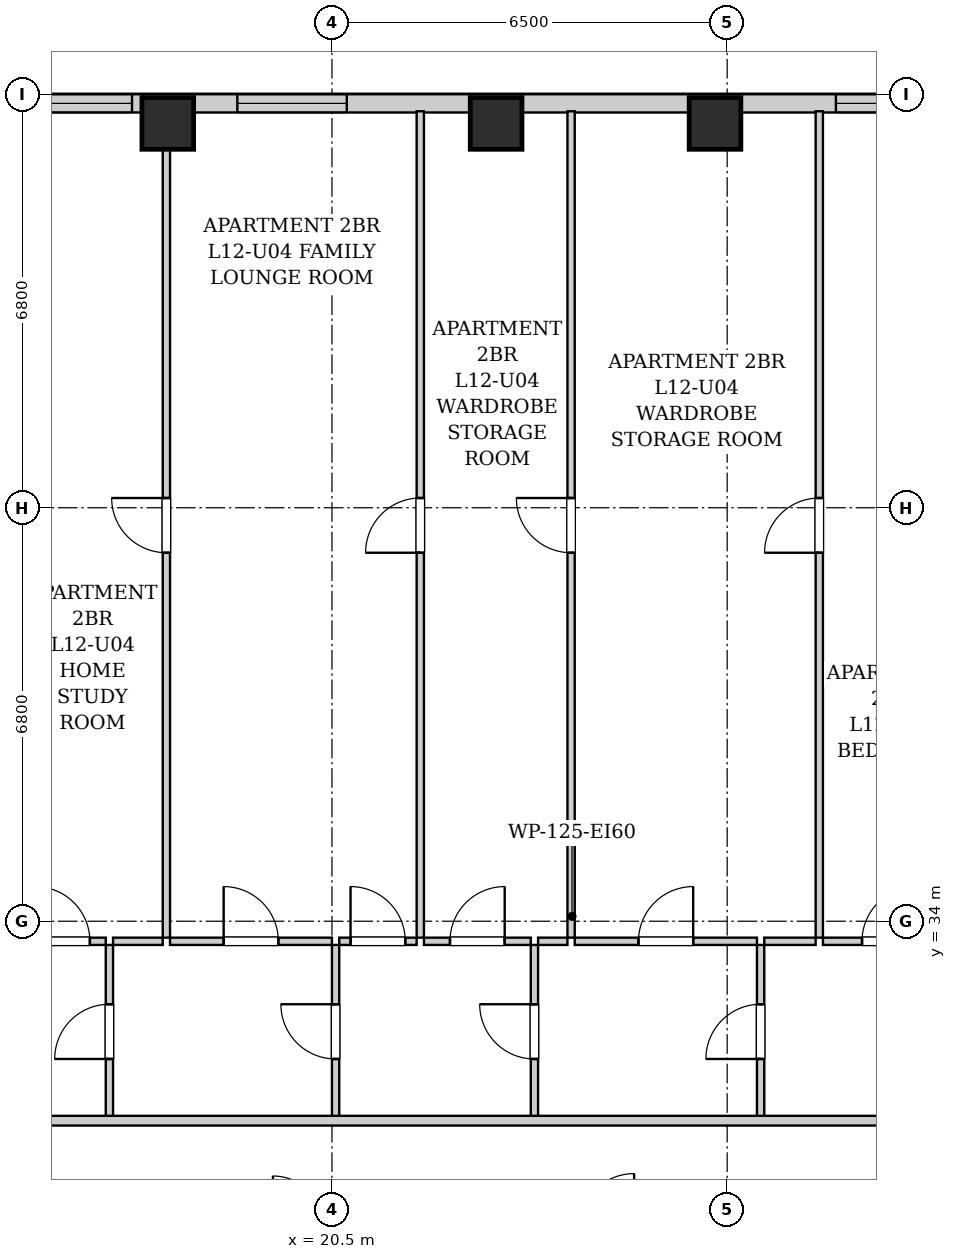
"""IFC4 building model, lengths in metres.
Left out: names, types, materials, properties, quantities, classifications, styles, units other than length and angle.
Written with IfcOpenShell. Run it as: python <this file> out.ifc"""

import sys

from ifc_helpers import new_model, si_unit, direction, frame, frame_2d, origin, origin_2d, place, context, subcontext, project, spatial, rectangle, extrude, element, fill, save


model = new_model("IFC4")
c1 = context("Model", 3, precision=1e-05, world=origin(), true_north=direction((0.0, 1.0)))
c2 = subcontext(c1, "Body", "Model", "MODEL_VIEW")
j1 = project(units=[si_unit("LENGTHUNIT", "METRE"), si_unit("PLANEANGLEUNIT", "RADIAN")], contexts=[c1])
p1 = place(None, origin())
s1 = spatial("IfcSite", under=j1, at=p1, CompositionType="ELEMENT")
p2 = place(p1, origin())
s2 = spatial("IfcBuilding", under=s1, at=p2, CompositionType="ELEMENT")
p3 = place(p2, frame((0.0, 0.0, 48.2)))
s3 = spatial("IfcBuildingStorey", under=s2, at=p3, CompositionType="ELEMENT", Elevation=48.2)
for number, where, z_axis, x_axis in (
    (1, (17.8, 47.12, 0.0), (0.0, 0.0, 1.0), (1.0, 0.0, 0.0)),
    (2, (23.2, 47.12, 0.0), (0.0, 0.0, 1.0), (1.0, 0.0, 0.0)),
    (3, (26.8, 47.12, 0.0), (0.0, 0.0, 1.0), (1.0, 0.0, 0.0)),
):
    element("IfcColumn", number, at=place(p3, frame(where, z_axis=z_axis, x_axis=x_axis)), inside=s3, PredefinedType="COLUMN", context=c2, shape_type="SweptSolid", body=[
        extrude(rectangle(XDim=0.85, YDim=0.85, at=origin_2d()), origin(), (0.0, 0.0, 1.0), 3.2),
    ])
p4 = place(p3, frame((10.0, 47.45, 0.0), z_axis=(0.0, 0.0, 1.0), x_axis=(1.0, 0.0, 0.0)))
e4 = element("IfcWall", 4, at=p4, inside=s3, PredefinedType="SOLIDWALL", context=c2, shape_type="SweptSolid", body=[
    extrude(rectangle(XDim=26.15, YDim=0.3, at=frame_2d((13.075, 0.0))), origin(), (0.0, 0.0, 1.0), 1.975),
])
p5 = place(p4, frame((5.862, 0.0, 0.55)))
e5 = element("IfcOpeningElement", 5, at=p5, cuts=e4, PredefinedType="OPENING", context=c2, shape_type="SweptSolid", body=[
    extrude(rectangle(XDim=1.35, YDim=1.2, at=frame_2d((0.675, 0.6))), frame((0.0, 0.16, 0.0), z_axis=(0.0, -1.0, 0.0), x_axis=(1.0, 0.0, 0.0)), (0.0, 0.0, 1.0), 0.32),
])
p6 = place(p4, frame((8.944, 0.0, 0.55)))
e6 = element("IfcOpeningElement", 6, at=p6, cuts=e4, PredefinedType="OPENING", context=c2, shape_type="SweptSolid", body=[
    extrude(rectangle(XDim=1.8, YDim=1.2, at=frame_2d((0.9, 0.6))), frame((0.0, 0.16, 0.0), z_axis=(0.0, -1.0, 0.0), x_axis=(1.0, 0.0, 0.0)), (0.0, 0.0, 1.0), 0.32),
])
p7 = place(p4, frame((18.788, 0.0, 0.55)))
e7 = element("IfcOpeningElement", 7, at=p7, cuts=e4, PredefinedType="OPENING", context=c2, shape_type="SweptSolid", body=[
    extrude(rectangle(XDim=1.8, YDim=1.2, at=frame_2d((0.9, 0.6))), frame((0.0, 0.16, 0.0), z_axis=(0.0, -1.0, 0.0), x_axis=(1.0, 0.0, 0.0)), (0.0, 0.0, 1.0), 0.32),
])
p8 = place(p4, frame((21.265, 0.0, 0.55)))
e8 = element("IfcOpeningElement", 8, at=p8, cuts=e4, PredefinedType="OPENING", context=c2, shape_type="SweptSolid", body=[
    extrude(rectangle(XDim=1.35, YDim=1.2, at=frame_2d((0.675, 0.6))), frame((0.0, 0.16, 0.0), z_axis=(0.0, -1.0, 0.0), x_axis=(1.0, 0.0, 0.0)), (0.0, 0.0, 1.0), 0.32),
])
p9 = place(p4, frame((23.785, 0.0, 0.55)))
e9 = element("IfcOpeningElement", 9, at=p9, cuts=e4, PredefinedType="OPENING", context=c2, shape_type="SweptSolid", body=[
    extrude(rectangle(XDim=1.8, YDim=1.2, at=frame_2d((0.9, 0.6))), frame((0.0, 0.16, 0.0), z_axis=(0.0, -1.0, 0.0), x_axis=(1.0, 0.0, 0.0)), (0.0, 0.0, 1.0), 0.32),
])
p10 = place(p3, frame((16.84, 30.76, 0.0), z_axis=(0.0, 0.0, 1.0), x_axis=(0.0, 1.0, 0.0)))
e10 = element("IfcWall", 10, at=p10, inside=s3, PredefinedType="PARTITIONING", context=c2, shape_type="SweptSolid", body=[
    extrude(rectangle(XDim=2.85, YDim=0.12, at=frame_2d((1.425, 0.0))), origin(), (0.0, 0.0, 1.0), 2.94),
])
p11 = place(p10, frame((0.975, 0.0, 0.0)))
e11 = element("IfcOpeningElement", 11, at=p11, cuts=e10, PredefinedType="OPENING", context=c2, shape_type="SweptSolid", body=[
    extrude(rectangle(XDim=0.9, YDim=2.05, at=frame_2d((0.45, 1.025))), frame((0.0, 0.07, 0.0), z_axis=(0.0, -1.0, 0.0), x_axis=(1.0, 0.0, 0.0)), (0.0, 0.0, 1.0), 0.14),
])
p12 = place(p3, frame((15.357, 33.67, 0.0), z_axis=(0.0, 0.0, 1.0), x_axis=(1.0, 0.0, 0.0)))
e12 = element("IfcWall", 12, at=p12, inside=s3, PredefinedType="PARTITIONING", context=c2, shape_type="SweptSolid", body=[
    extrude(rectangle(XDim=1.423, YDim=0.12, at=frame_2d((0.711, 0.0))), origin(), (0.0, 0.0, 1.0), 2.94),
])
p13 = place(p12, frame((0.262, 0.0, 0.0)))
e13 = element("IfcOpeningElement", 13, at=p13, cuts=e12, PredefinedType="OPENING", context=c2, shape_type="SweptSolid", body=[
    extrude(rectangle(XDim=0.9, YDim=2.05, at=frame_2d((0.45, 1.025))), frame((0.0, 0.07, 0.0), z_axis=(0.0, -1.0, 0.0), x_axis=(1.0, 0.0, 0.0)), (0.0, 0.0, 1.0), 0.14),
])
p14 = place(p3, frame((20.56, 30.76, 0.0), z_axis=(0.0, 0.0, 1.0), x_axis=(0.0, 1.0, 0.0)))
e14 = element("IfcWall", 14, at=p14, inside=s3, PredefinedType="PARTITIONING", context=c2, shape_type="SweptSolid", body=[
    extrude(rectangle(XDim=2.85, YDim=0.12, at=frame_2d((1.425, 0.0))), origin(), (0.0, 0.0, 1.0), 2.94),
])
p15 = place(p14, frame((0.975, 0.0, 0.0)))
e15 = element("IfcOpeningElement", 15, at=p15, cuts=e14, PredefinedType="OPENING", context=c2, shape_type="SweptSolid", body=[
    extrude(rectangle(XDim=0.9, YDim=2.05, at=frame_2d((0.45, 1.025))), frame((0.0, 0.07, 0.0), z_axis=(0.0, -1.0, 0.0), x_axis=(1.0, 0.0, 0.0)), (0.0, 0.0, 1.0), 0.14),
])
p16 = place(p3, frame((16.9, 33.67, 0.0), z_axis=(0.0, 0.0, 1.0), x_axis=(1.0, 0.0, 0.0)))
e16 = element("IfcWall", 16, at=p16, inside=s3, PredefinedType="PARTITIONING", context=c2, shape_type="SweptSolid", body=[
    extrude(rectangle(XDim=0.817, YDim=0.12, at=frame_2d((0.409, 0.0))), origin(), (0.0, 0.0, 1.0), 2.94),
])
p17 = place(p3, frame((17.837, 33.67, 0.0), z_axis=(0.0, 0.0, 1.0), x_axis=(1.0, 0.0, 0.0)))
e17 = element("IfcWall", 17, at=p17, inside=s3, PredefinedType="PARTITIONING", context=c2, shape_type="SweptSolid", body=[
    extrude(rectangle(XDim=2.663, YDim=0.12, at=frame_2d((1.332, 0.0))), origin(), (0.0, 0.0, 1.0), 2.94),
])
p18 = place(p17, frame((0.882, 0.0, 0.0)))
e18 = element("IfcOpeningElement", 18, at=p18, cuts=e17, PredefinedType="OPENING", context=c2, shape_type="SweptSolid", body=[
    extrude(rectangle(XDim=0.9, YDim=2.05, at=frame_2d((0.45, 1.025))), frame((0.0, 0.07, 0.0), z_axis=(0.0, -1.0, 0.0), x_axis=(1.0, 0.0, 0.0)), (0.0, 0.0, 1.0), 0.14),
])
p19 = place(p3, frame((23.83, 30.76, 0.0), z_axis=(0.0, 0.0, 1.0), x_axis=(0.0, 1.0, 0.0)))
e19 = element("IfcWall", 19, at=p19, inside=s3, PredefinedType="PARTITIONING", context=c2, shape_type="SweptSolid", body=[
    extrude(rectangle(XDim=2.85, YDim=0.12, at=frame_2d((1.425, 0.0))), origin(), (0.0, 0.0, 1.0), 2.94),
])
p20 = place(p19, frame((0.975, 0.0, 0.0)))
e20 = element("IfcOpeningElement", 20, at=p20, cuts=e19, PredefinedType="OPENING", context=c2, shape_type="SweptSolid", body=[
    extrude(rectangle(XDim=0.9, YDim=2.05, at=frame_2d((0.45, 1.025))), frame((0.0, 0.07, 0.0), z_axis=(0.0, -1.0, 0.0), x_axis=(1.0, 0.0, 0.0)), (0.0, 0.0, 1.0), 0.14),
])
p21 = place(p3, frame((20.62, 33.67, 0.0), z_axis=(0.0, 0.0, 1.0), x_axis=(1.0, 0.0, 0.0)))
e21 = element("IfcWall", 21, at=p21, inside=s3, PredefinedType="PARTITIONING", context=c2, shape_type="SweptSolid", body=[
    extrude(rectangle(XDim=1.273, YDim=0.12, at=frame_2d((0.636, 0.0))), origin(), (0.0, 0.0, 1.0), 2.94),
])
p22 = place(p21, frame((0.186, 0.0, 0.0)))
e22 = element("IfcOpeningElement", 22, at=p22, cuts=e21, PredefinedType="OPENING", context=c2, shape_type="SweptSolid", body=[
    extrude(rectangle(XDim=0.9, YDim=2.05, at=frame_2d((0.45, 1.025))), frame((0.0, 0.07, 0.0), z_axis=(0.0, -1.0, 0.0), x_axis=(1.0, 0.0, 0.0)), (0.0, 0.0, 1.0), 0.14),
])
p23 = place(p3, frame((22.013, 33.67, 0.0), z_axis=(0.0, 0.0, 1.0), x_axis=(1.0, 0.0, 0.0)))
e23 = element("IfcWall", 23, at=p23, inside=s3, PredefinedType="PARTITIONING", context=c2, shape_type="SweptSolid", body=[
    extrude(rectangle(XDim=1.757, YDim=0.12, at=frame_2d((0.878, 0.0))), origin(), (0.0, 0.0, 1.0), 2.94),
])
p24 = place(p23, frame((0.428, 0.0, 0.0)))
e24 = element("IfcOpeningElement", 24, at=p24, cuts=e23, PredefinedType="OPENING", context=c2, shape_type="SweptSolid", body=[
    extrude(rectangle(XDim=0.9, YDim=2.05, at=frame_2d((0.45, 1.025))), frame((0.0, 0.07, 0.0), z_axis=(0.0, -1.0, 0.0), x_axis=(1.0, 0.0, 0.0)), (0.0, 0.0, 1.0), 0.14),
])
p25 = place(p3, frame((27.55, 30.76, 0.0), z_axis=(0.0, 0.0, 1.0), x_axis=(0.0, 1.0, 0.0)))
e25 = element("IfcWall", 25, at=p25, inside=s3, PredefinedType="PARTITIONING", context=c2, shape_type="SweptSolid", body=[
    extrude(rectangle(XDim=2.85, YDim=0.12, at=frame_2d((1.425, 0.0))), origin(), (0.0, 0.0, 1.0), 2.94),
])
p26 = place(p25, frame((0.975, 0.0, 0.0)))
e26 = element("IfcOpeningElement", 26, at=p26, cuts=e25, PredefinedType="OPENING", context=c2, shape_type="SweptSolid", body=[
    extrude(rectangle(XDim=0.9, YDim=2.05, at=frame_2d((0.45, 1.025))), frame((0.0, 0.07, 0.0), z_axis=(0.0, -1.0, 0.0), x_axis=(1.0, 0.0, 0.0)), (0.0, 0.0, 1.0), 0.14),
])
p27 = place(p3, frame((23.89, 33.67, 0.0), z_axis=(0.0, 0.0, 1.0), x_axis=(1.0, 0.0, 0.0)))
e27 = element("IfcWall", 27, at=p27, inside=s3, PredefinedType="PARTITIONING", context=c2, shape_type="SweptSolid", body=[
    extrude(rectangle(XDim=0.483, YDim=0.12, at=frame_2d((0.242, 0.0))), origin(), (0.0, 0.0, 1.0), 2.94),
])
p28 = place(p3, frame((24.493, 33.67, 0.0), z_axis=(0.0, 0.0, 1.0), x_axis=(1.0, 0.0, 0.0)))
e28 = element("IfcWall", 28, at=p28, inside=s3, PredefinedType="PARTITIONING", context=c2, shape_type="SweptSolid", body=[
    extrude(rectangle(XDim=2.997, YDim=0.12, at=frame_2d((1.499, 0.0))), origin(), (0.0, 0.0, 1.0), 2.94),
])
p29 = place(p28, frame((1.048, 0.0, 0.0)))
e29 = element("IfcOpeningElement", 29, at=p29, cuts=e28, PredefinedType="OPENING", context=c2, shape_type="SweptSolid", body=[
    extrude(rectangle(XDim=0.9, YDim=2.05, at=frame_2d((0.45, 1.025))), frame((0.0, 0.07, 0.0), z_axis=(0.0, -1.0, 0.0), x_axis=(1.0, 0.0, 0.0)), (0.0, 0.0, 1.0), 0.14),
])
p30 = place(p3, frame((27.61, 33.67, 0.0), z_axis=(0.0, 0.0, 1.0), x_axis=(1.0, 0.0, 0.0)))
e30 = element("IfcWall", 30, at=p30, inside=s3, PredefinedType="PARTITIONING", context=c2, shape_type="SweptSolid", body=[
    extrude(rectangle(XDim=0.845, YDim=0.12, at=frame_2d((0.422, 0.0))), origin(), (0.0, 0.0, 1.0), 2.94),
])
p31 = place(p3, frame((28.575, 33.67, 0.0), z_axis=(0.0, 0.0, 1.0), x_axis=(1.0, 0.0, 0.0)))
e31 = element("IfcWall", 31, at=p31, inside=s3, PredefinedType="PARTITIONING", context=c2, shape_type="SweptSolid", body=[
    extrude(rectangle(XDim=2.185, YDim=0.12, at=frame_2d((1.093, 0.0))), origin(), (0.0, 0.0, 1.0), 2.94),
])
p32 = place(p31, frame((0.643, 0.0, 0.0)))
e32 = element("IfcOpeningElement", 32, at=p32, cuts=e31, PredefinedType="OPENING", context=c2, shape_type="SweptSolid", body=[
    extrude(rectangle(XDim=0.9, YDim=2.05, at=frame_2d((0.45, 1.025))), frame((0.0, 0.07, 0.0), z_axis=(0.0, -1.0, 0.0), x_axis=(1.0, 0.0, 0.0)), (0.0, 0.0, 1.0), 0.14),
])
p33 = place(p3, frame((17.777, 33.73, 0.0), z_axis=(0.0, 0.0, 1.0), x_axis=(0.0, 1.0, 0.0)))
e33 = element("IfcWall", 33, at=p33, inside=s3, PredefinedType="PARTITIONING", context=c2, shape_type="SweptSolid", body=[
    extrude(rectangle(XDim=13.59, YDim=0.12, at=frame_2d((6.795, 0.0))), origin(), (0.0, 0.0, 1.0), 2.232),
])
p34 = place(p33, frame((6.33, 0.0, 0.0)))
e34 = element("IfcOpeningElement", 34, at=p34, cuts=e33, PredefinedType="OPENING", context=c2, shape_type="SweptSolid", body=[
    extrude(rectangle(XDim=0.9, YDim=2.05, at=frame_2d((0.45, 1.025))), frame((0.0, 0.07, 0.0), z_axis=(0.0, -1.0, 0.0), x_axis=(1.0, 0.0, 0.0)), (0.0, 0.0, 1.0), 0.14),
])
p35 = place(p3, frame((21.953, 33.73, 0.0), z_axis=(0.0, 0.0, 1.0), x_axis=(0.0, 1.0, 0.0)))
e35 = element("IfcWall", 35, at=p35, inside=s3, PredefinedType="PARTITIONING", context=c2, shape_type="SweptSolid", body=[
    extrude(rectangle(XDim=13.59, YDim=0.12, at=frame_2d((6.795, 0.0))), origin(), (0.0, 0.0, 1.0), 2.94),
])
p36 = place(p35, frame((6.33, 0.0, 0.0)))
e36 = element("IfcOpeningElement", 36, at=p36, cuts=e35, PredefinedType="OPENING", context=c2, shape_type="SweptSolid", body=[
    extrude(rectangle(XDim=0.9, YDim=2.05, at=frame_2d((0.45, 1.025))), frame((0.0, 0.07, 0.0), z_axis=(0.0, -1.0, 0.0), x_axis=(1.0, 0.0, 0.0)), (0.0, 0.0, 1.0), 0.14),
])
p37 = place(p3, frame((24.433, 33.73, 0.0), z_axis=(0.0, 0.0, 1.0), x_axis=(0.0, 1.0, 0.0)))
e37 = element("IfcWall", 37, at=p37, inside=s3, PredefinedType="PARTITIONING", context=c2, shape_type="SweptSolid", body=[
    extrude(rectangle(XDim=13.59, YDim=0.12, at=frame_2d((6.795, 0.0))), origin(), (0.0, 0.0, 1.0), 2.94),
])
p38 = place(p37, frame((6.33, 0.0, 0.0)))
e38 = element("IfcOpeningElement", 38, at=p38, cuts=e37, PredefinedType="OPENING", context=c2, shape_type="SweptSolid", body=[
    extrude(rectangle(XDim=0.9, YDim=2.05, at=frame_2d((0.45, 1.025))), frame((0.0, 0.07, 0.0), z_axis=(0.0, -1.0, 0.0), x_axis=(1.0, 0.0, 0.0)), (0.0, 0.0, 1.0), 0.14),
])
p39 = place(p3, frame((28.515, 33.73, 0.0), z_axis=(0.0, 0.0, 1.0), x_axis=(0.0, 1.0, 0.0)))
e39 = element("IfcWall", 39, at=p39, inside=s3, PredefinedType="PARTITIONING", context=c2, shape_type="SweptSolid", body=[
    extrude(rectangle(XDim=13.59, YDim=0.12, at=frame_2d((6.795, 0.0))), origin(), (0.0, 0.0, 1.0), 2.94),
])
p40 = place(p39, frame((6.33, 0.0, 0.0)))
e40 = element("IfcOpeningElement", 40, at=p40, cuts=e39, PredefinedType="OPENING", context=c2, shape_type="SweptSolid", body=[
    extrude(rectangle(XDim=0.9, YDim=2.05, at=frame_2d((0.45, 1.025))), frame((0.0, 0.07, 0.0), z_axis=(0.0, -1.0, 0.0), x_axis=(1.0, 0.0, 0.0)), (0.0, 0.0, 1.0), 0.14),
])
p41 = place(p3, frame((10.05, 30.72, 0.0), z_axis=(0.0, 0.0, 1.0), x_axis=(1.0, 0.0, 0.0)))
e41 = element("IfcWall", 41, at=p41, inside=s3, PredefinedType="PARTITIONING", context=c2, shape_type="SweptSolid", body=[
    extrude(rectangle(XDim=33.9, YDim=0.16, at=frame_2d((16.95, 0.0))), origin(), (0.0, 0.0, 1.0), 2.94),
])
p42 = place(p41, frame((4.165, 0.0, 0.0)))
e42 = element("IfcOpeningElement", 42, at=p42, cuts=e41, PredefinedType="OPENING", context=c2, shape_type="SweptSolid", body=[
    extrude(rectangle(XDim=0.95, YDim=2.1, at=frame_2d((0.475, 1.05))), frame((0.0, 0.09, 0.0), z_axis=(0.0, -1.0, 0.0), x_axis=(1.0, 0.0, 0.0)), (0.0, 0.0, 1.0), 0.18),
])
p43 = place(p41, frame((27.495, 0.0, 0.0)))
e43 = element("IfcOpeningElement", 43, at=p43, cuts=e41, PredefinedType="OPENING", context=c2, shape_type="SweptSolid", body=[
    extrude(rectangle(XDim=0.95, YDim=2.1, at=frame_2d((0.475, 1.05))), frame((0.0, 0.09, 0.0), z_axis=(0.0, -1.0, 0.0), x_axis=(1.0, 0.0, 0.0)), (0.0, 0.0, 1.0), 0.18),
])
p44 = place(p11, origin())
e44 = element("IfcDoor", 44, at=p44, inside=s3, OperationType="SINGLE_SWING_LEFT", PredefinedType="DOOR", context=c2, shape_type="SweptSolid", body=[
    extrude(rectangle(XDim=0.9, YDim=2.05, at=frame_2d((0.45, 1.025))), frame((0.0, 0.025, 0.0), z_axis=(0.0, -1.0, 0.0), x_axis=(1.0, 0.0, 0.0)), (0.0, 0.0, 1.0), 0.05),
])
fill(e11, e44)
p45 = place(p13, origin())
e45 = element("IfcDoor", 45, at=p45, inside=s3, OperationType="SINGLE_SWING_LEFT", PredefinedType="DOOR", context=c2, shape_type="SweptSolid", body=[
    extrude(rectangle(XDim=0.9, YDim=2.05, at=frame_2d((0.45, 1.025))), frame((0.0, 0.025, 0.0), z_axis=(0.0, -1.0, 0.0), x_axis=(1.0, 0.0, 0.0)), (0.0, 0.0, 1.0), 0.05),
])
fill(e13, e45)
p46 = place(p15, origin())
e46 = element("IfcDoor", 46, at=p46, inside=s3, OperationType="SINGLE_SWING_RIGHT", PredefinedType="DOOR", context=c2, shape_type="SweptSolid", body=[
    extrude(rectangle(XDim=0.9, YDim=2.05, at=frame_2d((0.45, 1.025))), frame((0.0, 0.025, 0.0), z_axis=(0.0, -1.0, 0.0), x_axis=(1.0, 0.0, 0.0)), (0.0, 0.0, 1.0), 0.05),
])
fill(e15, e46)
p47 = place(p18, origin())
e47 = element("IfcDoor", 47, at=p47, inside=s3, OperationType="SINGLE_SWING_LEFT", PredefinedType="DOOR", context=c2, shape_type="SweptSolid", body=[
    extrude(rectangle(XDim=0.9, YDim=2.05, at=frame_2d((0.45, 1.025))), frame((0.0, 0.025, 0.0), z_axis=(0.0, -1.0, 0.0), x_axis=(1.0, 0.0, 0.0)), (0.0, 0.0, 1.0), 0.05),
])
fill(e18, e47)
p48 = place(p20, origin())
e48 = element("IfcDoor", 48, at=p48, inside=s3, OperationType="SINGLE_SWING_RIGHT", PredefinedType="DOOR", context=c2, shape_type="SweptSolid", body=[
    extrude(rectangle(XDim=0.9, YDim=2.05, at=frame_2d((0.45, 1.025))), frame((0.0, 0.025, 0.0), z_axis=(0.0, -1.0, 0.0), x_axis=(1.0, 0.0, 0.0)), (0.0, 0.0, 1.0), 0.05),
])
fill(e20, e48)
p49 = place(p22, origin())
e49 = element("IfcDoor", 49, at=p49, inside=s3, OperationType="SINGLE_SWING_LEFT", PredefinedType="DOOR", context=c2, shape_type="SweptSolid", body=[
    extrude(rectangle(XDim=0.9, YDim=2.05, at=frame_2d((0.45, 1.025))), frame((0.0, 0.025, 0.0), z_axis=(0.0, -1.0, 0.0), x_axis=(1.0, 0.0, 0.0)), (0.0, 0.0, 1.0), 0.05),
])
fill(e22, e49)
p50 = place(p24, origin())
e50 = element("IfcDoor", 50, at=p50, inside=s3, OperationType="SINGLE_SWING_RIGHT", PredefinedType="DOOR", context=c2, shape_type="SweptSolid", body=[
    extrude(rectangle(XDim=0.9, YDim=2.05, at=frame_2d((0.45, 1.025))), frame((0.0, 0.025, 0.0), z_axis=(0.0, -1.0, 0.0), x_axis=(1.0, 0.0, 0.0)), (0.0, 0.0, 1.0), 0.05),
])
fill(e24, e50)
p51 = place(p26, origin())
e51 = element("IfcDoor", 51, at=p51, inside=s3, OperationType="SINGLE_SWING_LEFT", PredefinedType="DOOR", context=c2, shape_type="SweptSolid", body=[
    extrude(rectangle(XDim=0.9, YDim=2.05, at=frame_2d((0.45, 1.025))), frame((0.0, 0.025, 0.0), z_axis=(0.0, -1.0, 0.0), x_axis=(1.0, 0.0, 0.0)), (0.0, 0.0, 1.0), 0.05),
])
fill(e26, e51)
p52 = place(p29, origin())
e52 = element("IfcDoor", 52, at=p52, inside=s3, OperationType="SINGLE_SWING_RIGHT", PredefinedType="DOOR", context=c2, shape_type="SweptSolid", body=[
    extrude(rectangle(XDim=0.9, YDim=2.05, at=frame_2d((0.45, 1.025))), frame((0.0, 0.025, 0.0), z_axis=(0.0, -1.0, 0.0), x_axis=(1.0, 0.0, 0.0)), (0.0, 0.0, 1.0), 0.05),
])
fill(e29, e52)
p53 = place(p32, origin())
e53 = element("IfcDoor", 53, at=p53, inside=s3, OperationType="SINGLE_SWING_RIGHT", PredefinedType="DOOR", context=c2, shape_type="SweptSolid", body=[
    extrude(rectangle(XDim=0.9, YDim=2.05, at=frame_2d((0.45, 1.025))), frame((0.0, 0.025, 0.0), z_axis=(0.0, -1.0, 0.0), x_axis=(1.0, 0.0, 0.0)), (0.0, 0.0, 1.0), 0.05),
])
fill(e32, e53)
p54 = place(p34, origin())
e54 = element("IfcDoor", 54, at=p54, inside=s3, OperationType="SINGLE_SWING_RIGHT", PredefinedType="DOOR", context=c2, shape_type="SweptSolid", body=[
    extrude(rectangle(XDim=0.9, YDim=2.05, at=frame_2d((0.45, 1.025))), frame((0.0, 0.025, 0.0), z_axis=(0.0, -1.0, 0.0), x_axis=(1.0, 0.0, 0.0)), (0.0, 0.0, 1.0), 0.05),
])
fill(e34, e54)
p55 = place(p36, origin())
e55 = element("IfcDoor", 55, at=p55, inside=s3, OperationType="SINGLE_SWING_LEFT", PredefinedType="DOOR", context=c2, shape_type="SweptSolid", body=[
    extrude(rectangle(XDim=0.9, YDim=2.05, at=frame_2d((0.45, 1.025))), frame((0.0, 0.025, 0.0), z_axis=(0.0, -1.0, 0.0), x_axis=(1.0, 0.0, 0.0)), (0.0, 0.0, 1.0), 0.05),
])
fill(e36, e55)
p56 = place(p38, origin())
e56 = element("IfcDoor", 56, at=p56, inside=s3, OperationType="SINGLE_SWING_RIGHT", PredefinedType="DOOR", context=c2, shape_type="SweptSolid", body=[
    extrude(rectangle(XDim=0.9, YDim=2.05, at=frame_2d((0.45, 1.025))), frame((0.0, 0.025, 0.0), z_axis=(0.0, -1.0, 0.0), x_axis=(1.0, 0.0, 0.0)), (0.0, 0.0, 1.0), 0.05),
])
fill(e38, e56)
p57 = place(p40, origin())
e57 = element("IfcDoor", 57, at=p57, inside=s3, OperationType="SINGLE_SWING_LEFT", PredefinedType="DOOR", context=c2, shape_type="SweptSolid", body=[
    extrude(rectangle(XDim=0.9, YDim=2.05, at=frame_2d((0.45, 1.025))), frame((0.0, 0.025, 0.0), z_axis=(0.0, -1.0, 0.0), x_axis=(1.0, 0.0, 0.0)), (0.0, 0.0, 1.0), 0.05),
])
fill(e40, e57)
p58 = place(p5, origin())
e58 = element("IfcWindow", 58, at=p58, inside=s3, PartitioningType="SINGLE_PANEL", PredefinedType="WINDOW", context=c2, shape_type="SweptSolid", body=[
    extrude(rectangle(XDim=1.35, YDim=1.2, at=frame_2d((0.675, 0.6))), frame((0.0, 0.03, 0.0), z_axis=(0.0, -1.0, 0.0), x_axis=(1.0, 0.0, 0.0)), (0.0, 0.0, 1.0), 0.06),
])
fill(e5, e58)
p59 = place(p6, origin())
e59 = element("IfcWindow", 59, at=p59, inside=s3, PartitioningType="DOUBLE_PANEL_VERTICAL", PredefinedType="WINDOW", context=c2, shape_type="SweptSolid", body=[
    extrude(rectangle(XDim=1.8, YDim=1.2, at=frame_2d((0.9, 0.6))), frame((0.0, 0.03, 0.0), z_axis=(0.0, -1.0, 0.0), x_axis=(1.0, 0.0, 0.0)), (0.0, 0.0, 1.0), 0.06),
])
fill(e6, e59)
p60 = place(p7, origin())
e60 = element("IfcWindow", 60, at=p60, inside=s3, PartitioningType="DOUBLE_PANEL_VERTICAL", PredefinedType="WINDOW", context=c2, shape_type="SweptSolid", body=[
    extrude(rectangle(XDim=1.8, YDim=1.2, at=frame_2d((0.9, 0.6))), frame((0.0, 0.03, 0.0), z_axis=(0.0, -1.0, 0.0), x_axis=(1.0, 0.0, 0.0)), (0.0, 0.0, 1.0), 0.06),
])
fill(e7, e60)
save(model, sys.argv[1])
